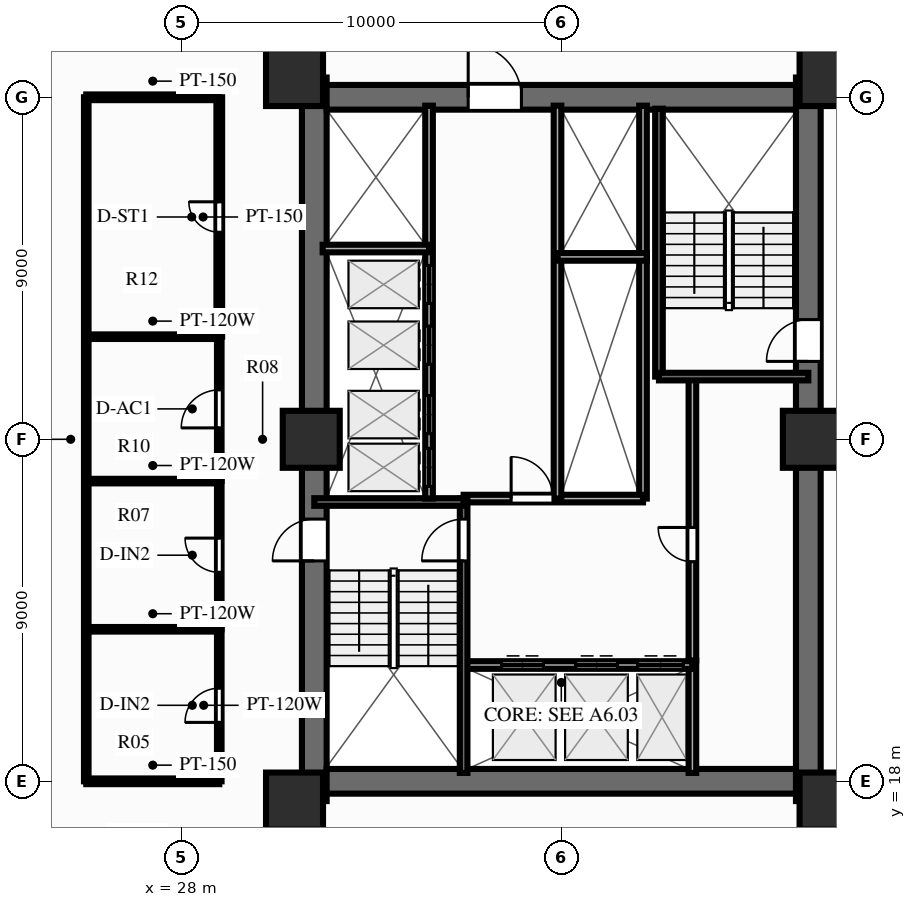
"""IFC4 building model, lengths in metres.
Left out: names, types, materials, properties, quantities, classifications, styles, units other than length and angle.
Written with IfcOpenShell. Run it as: python <this file> out.ifc"""

import sys

from ifc_helpers import new_model, si_unit, direction, frame, frame_2d, origin, origin_2d, place, context, subcontext, project, spatial, rectangle, extrude, source, transform, mapped, element, fill, save


model = new_model("IFC4")
c1 = context("Model", 3, precision=1e-05, world=origin(), true_north=direction((0.0, 1.0)))
c2 = subcontext(c1, "Body", "Model", "MODEL_VIEW")
j1 = project(units=[si_unit("LENGTHUNIT", "METRE"), si_unit("PLANEANGLEUNIT", "RADIAN")], contexts=[c1])
p1 = place(None, origin())
s1 = spatial("IfcSite", under=j1, at=p1, CompositionType="ELEMENT")
p2 = place(p1, origin())
s2 = spatial("IfcBuilding", under=s1, at=p2, CompositionType="ELEMENT")
p3 = place(p2, frame((0.0, 0.0, 7.8)))
s3 = spatial("IfcBuildingStorey", under=s2, at=p3, CompositionType="ELEMENT", Elevation=7.8)
p4 = place(p3, frame((31.5, 17.48, 0.0), z_axis=(0.0, 0.0, 1.0), x_axis=(0.0, 1.0, 0.0)))
e1 = element("IfcWall", 1, at=p4, inside=s3, PredefinedType="SHEAR", context=c2, shape_type="SweptSolid", body=[
    extrude(rectangle(XDim=19.04, YDim=0.65, at=frame_2d((9.52, 0.0))), origin(), (0.0, 0.0, 1.0), 3.6),
])
p5 = place(p4, frame((6.32, 0.0, 0.0)))
e2 = element("IfcOpeningElement", 2, at=p5, cuts=e1, PredefinedType="OPENING", context=c2, shape_type="SweptSolid", body=[
    extrude(rectangle(XDim=1.1, YDim=2.15, at=frame_2d((0.55, 1.075))), frame((0.0, 0.337, 0.0), z_axis=(0.0, -1.0, 0.0), x_axis=(1.0, 0.0, 0.0)), (0.0, 0.0, 1.0), 0.674),
])
p6 = place(p3, frame((44.5, 17.48, 0.0), z_axis=(0.0, 0.0, 1.0), x_axis=(0.0, 1.0, 0.0)))
e3 = element("IfcWall", 3, at=p6, inside=s3, PredefinedType="SHEAR", context=c2, shape_type="SweptSolid", body=[
    extrude(rectangle(XDim=19.04, YDim=0.65, at=frame_2d((9.52, 0.0))), origin(), (0.0, 0.0, 1.0), 3.6),
])
p7 = place(p6, frame((12.67, 0.0, 0.0), z_axis=(0.0, 0.0, 1.0), x_axis=(-1.0, 0.0, 0.0)))
e4 = element("IfcOpeningElement", 4, at=p7, cuts=e3, PredefinedType="OPENING", context=c2, shape_type="SweptSolid", body=[
    extrude(rectangle(XDim=1.1, YDim=2.15, at=frame_2d((0.55, 1.075))), frame((0.0, 0.337, 0.0), z_axis=(0.0, -1.0, 0.0), x_axis=(1.0, 0.0, 0.0)), (0.0, 0.0, 1.0), 0.674),
])
p8 = place(p3, frame((31.825, 18.0, 0.0), z_axis=(0.0, 0.0, 1.0), x_axis=(1.0, 0.0, 0.0)))
e5 = element("IfcWall", 5, at=p8, inside=s3, PredefinedType="SHEAR", context=c2, shape_type="SweptSolid", body=[
    extrude(rectangle(XDim=12.35, YDim=0.65, at=frame_2d((6.175, 0.0))), origin(), (0.0, 0.0, 1.0), 3.6),
])
p9 = place(p3, frame((31.825, 36.0, 0.0), z_axis=(0.0, 0.0, 1.0), x_axis=(1.0, 0.0, 0.0)))
e6 = element("IfcWall", 6, at=p9, inside=s3, PredefinedType="SHEAR", context=c2, shape_type="SweptSolid", body=[
    extrude(rectangle(XDim=12.35, YDim=0.65, at=frame_2d((6.175, 0.0))), origin(), (0.0, 0.0, 1.0), 3.6),
])
p10 = place(p9, frame((5.125, 0.0, 0.0), z_axis=(0.0, 0.0, 1.0), x_axis=(-1.0, 0.0, 0.0)))
e7 = element("IfcOpeningElement", 7, at=p10, cuts=e6, PredefinedType="OPENING", context=c2, shape_type="SweptSolid", body=[
    extrude(rectangle(XDim=1.4, YDim=2.15, at=frame_2d((0.7, 1.075))), frame((0.0, 0.337, 0.0), z_axis=(0.0, -1.0, 0.0), x_axis=(1.0, 0.0, 0.0)), (0.0, 0.0, 1.0), 0.674),
])
m1 = source(origin(), c2, "Body", "SweptSolid", [
    extrude(rectangle(XDim=1.5, YDim=1.5, at=origin_2d()), origin(), (0.0, 0.0, 1.0), 3.6),
])
for number, where, z_axis, x_axis in (
    (8, (30.98, 17.48, 0.0), (0.0, 0.0, 1.0), (1.0, 0.0, 0.0)),
    (9, (45.02, 17.48, 0.0), (0.0, 0.0, 1.0), (1.0, 0.0, 0.0)),
    (10, (30.98, 36.52, 0.0), (0.0, 0.0, 1.0), (1.0, 0.0, 0.0)),
    (11, (45.02, 36.52, 0.0), (0.0, 0.0, 1.0), (1.0, 0.0, 0.0)),
    (12, (31.42, 27.0, 0.0), (0.0, 0.0, 1.0), (1.0, 0.0, 0.0)),
    (13, (44.58, 27.0, 0.0), (0.0, 0.0, 1.0), (1.0, 0.0, 0.0)),
):
    element("IfcColumn", number, at=place(p3, frame(where, z_axis=z_axis, x_axis=x_axis)), inside=s3, PredefinedType="COLUMN", context=c2, shape_type="MappedRepresentation", body=[
        mapped(m1, transform((0.0, 0.0, 0.0), scale=1.0)),
    ])
p11 = place(p3, frame((41.45, 18.22, 0.0), z_axis=(0.0, 0.0, 1.0), x_axis=(0.0, 1.0, 0.0)))
e14 = element("IfcWall", 14, at=p11, inside=s3, PredefinedType="PARTITIONING", context=c2, shape_type="SweptSolid", body=[
    extrude(rectangle(XDim=2.96, YDim=0.2, at=frame_2d((1.48, 0.0))), origin(), (0.0, 0.0, 1.0), 3.32),
])
p12 = place(p3, frame((41.45, 21.18, 0.0), z_axis=(0.0, 0.0, 1.0), x_axis=(0.0, 1.0, 0.0)))
e15 = element("IfcWall", 15, at=p12, inside=s3, PredefinedType="PARTITIONING", context=c2, shape_type="SweptSolid", body=[
    extrude(rectangle(XDim=7.42, YDim=0.2, at=frame_2d((3.71, 0.0))), origin(), (0.0, 0.0, 1.0), 3.32),
])
p13 = place(p12, frame((2.6, 0.0, 0.0)))
e16 = element("IfcOpeningElement", 16, at=p13, cuts=e15, PredefinedType="OPENING", context=c2, shape_type="SweptSolid", body=[
    extrude(rectangle(XDim=0.9, YDim=2.1, at=frame_2d((0.45, 1.05))), frame((0.0, 0.112, 0.0), z_axis=(0.0, -1.0, 0.0), x_axis=(1.0, 0.0, 0.0)), (0.0, 0.0, 1.0), 0.224),
])
p14 = place(p3, frame((40.15, 25.44, 0.0), z_axis=(0.0, 0.0, 1.0), x_axis=(0.0, 1.0, 0.0)))
e17 = element("IfcWall", 17, at=p14, inside=s3, PredefinedType="PARTITIONING", context=c2, shape_type="SweptSolid", body=[
    extrude(rectangle(XDim=6.36, YDim=0.2, at=frame_2d((3.18, 0.0))), origin(), (0.0, 0.0, 1.0), 3.32),
])
p15 = place(p3, frame((40.15, 31.8, 0.0), z_axis=(0.0, 0.0, 1.0), x_axis=(0.0, 1.0, 0.0)))
e18 = element("IfcWall", 18, at=p15, inside=s3, PredefinedType="PARTITIONING", context=c2, shape_type="SweptSolid", body=[
    extrude(rectangle(XDim=3.98, YDim=0.2, at=frame_2d((1.99, 0.0))), origin(), (0.0, 0.0, 1.0), 3.32),
])
p16 = place(p3, frame((35.43, 21.06, 0.0), z_axis=(0.0, 0.0, 1.0), x_axis=(1.0, 0.0, 0.0)))
e19 = element("IfcWall", 19, at=p16, inside=s3, PredefinedType="PARTITIONING", context=c2, shape_type="SweptSolid", body=[
    extrude(rectangle(XDim=6.02, YDim=0.2, at=frame_2d((3.01, 0.0))), origin(), (0.0, 0.0, 1.0), 3.32),
])
p17 = place(p16, frame((1.0, 0.0, 0.0)))
e20 = element("IfcOpeningElement", 20, at=p17, cuts=e19, PredefinedType="OPENING", context=c2, shape_type="SweptSolid", body=[
    extrude(rectangle(XDim=1.1, YDim=2.15, at=frame_2d((0.55, 1.075))), frame((0.0, 0.112, 0.0), z_axis=(0.0, -1.0, 0.0), x_axis=(1.0, 0.0, 0.0)), (0.0, 0.0, 1.0), 0.224),
])
p18 = place(p16, frame((2.95, 0.0, 0.0)))
e21 = element("IfcOpeningElement", 21, at=p18, cuts=e19, PredefinedType="OPENING", context=c2, shape_type="SweptSolid", body=[
    extrude(rectangle(XDim=1.1, YDim=2.15, at=frame_2d((0.55, 1.075))), frame((0.0, 0.112, 0.0), z_axis=(0.0, -1.0, 0.0), x_axis=(1.0, 0.0, 0.0)), (0.0, 0.0, 1.0), 0.224),
])
p19 = place(p16, frame((4.58, 0.0, 0.0)))
e22 = element("IfcOpeningElement", 22, at=p19, cuts=e19, PredefinedType="OPENING", context=c2, shape_type="SweptSolid", body=[
    extrude(rectangle(XDim=1.2, YDim=2.15, at=frame_2d((0.6, 1.075))), frame((0.0, 0.112, 0.0), z_axis=(0.0, -1.0, 0.0), x_axis=(1.0, 0.0, 0.0)), (0.0, 0.0, 1.0), 0.224),
])
p20 = place(p3, frame((35.43, 25.44, 0.0), z_axis=(0.0, 0.0, 1.0), x_axis=(1.0, 0.0, 0.0)))
e23 = element("IfcWall", 23, at=p20, inside=s3, PredefinedType="PARTITIONING", context=c2, shape_type="SweptSolid", body=[
    extrude(rectangle(XDim=4.72, YDim=0.2, at=frame_2d((2.36, 0.0))), origin(), (0.0, 0.0, 1.0), 3.32),
])
p21 = place(p20, frame((1.25, 0.0, 0.0)))
e24 = element("IfcOpeningElement", 24, at=p21, cuts=e23, PredefinedType="OPENING", context=c2, shape_type="SweptSolid", body=[
    extrude(rectangle(XDim=1.1, YDim=2.15, at=frame_2d((0.55, 1.075))), frame((0.0, 0.112, 0.0), z_axis=(0.0, -1.0, 0.0), x_axis=(1.0, 0.0, 0.0)), (0.0, 0.0, 1.0), 0.224),
])
p22 = place(p3, frame((35.43, 18.22, 0.0), z_axis=(0.0, 0.0, 1.0), x_axis=(0.0, 1.0, 0.0)))
e25 = element("IfcWall", 25, at=p22, inside=s3, PredefinedType="SOLIDWALL", context=c2, shape_type="SweptSolid", body=[
    extrude(rectangle(XDim=7.22, YDim=0.2, at=frame_2d((3.61, 0.0))), origin(), (0.0, 0.0, 1.0), 3.32),
])
p23 = place(p22, frame((6.68, 0.0, 0.0), z_axis=(0.0, 0.0, 1.0), x_axis=(-1.0, 0.0, 0.0)))
e26 = element("IfcOpeningElement", 26, at=p23, cuts=e25, PredefinedType="OPENING", context=c2, shape_type="SweptSolid", body=[
    extrude(rectangle(XDim=1.1, YDim=2.15, at=frame_2d((0.55, 1.075))), frame((0.0, 0.112, 0.0), z_axis=(0.0, -1.0, 0.0), x_axis=(1.0, 0.0, 0.0)), (0.0, 0.0, 1.0), 0.224),
])
p24 = place(p3, frame((31.5, 25.35, 0.0), z_axis=(0.0, 0.0, 1.0), x_axis=(1.0, 0.0, 0.0)))
e27 = element("IfcWall", 27, at=p24, inside=s3, PredefinedType="SOLIDWALL", context=c2, shape_type="SweptSolid", body=[
    extrude(rectangle(XDim=3.93, YDim=0.2, at=frame_2d((1.965, 0.0))), origin(), (0.0, 0.0, 1.0), 3.32),
])
p25 = place(p3, frame((40.57, 28.65, 0.0), z_axis=(0.0, 0.0, 1.0), x_axis=(0.0, 1.0, 0.0)))
e28 = element("IfcWall", 28, at=p25, inside=s3, PredefinedType="SOLIDWALL", context=c2, shape_type="SweptSolid", body=[
    extrude(rectangle(XDim=7.05, YDim=0.2, at=frame_2d((3.525, 0.0))), origin(), (0.0, 0.0, 1.0), 3.32),
])
p26 = place(p3, frame((40.57, 28.65, 0.0), z_axis=(0.0, 0.0, 1.0), x_axis=(1.0, 0.0, 0.0)))
e29 = element("IfcWall", 29, at=p26, inside=s3, PredefinedType="SOLIDWALL", context=c2, shape_type="SweptSolid", body=[
    extrude(rectangle(XDim=3.93, YDim=0.2, at=frame_2d((1.965, 0.0))), origin(), (0.0, 0.0, 1.0), 3.32),
])
p27 = place(p3, frame((34.52, 25.44, 0.0), z_axis=(0.0, 0.0, 1.0), x_axis=(0.0, 1.0, 0.0)))
e30 = element("IfcWall", 30, at=p27, inside=s3, PredefinedType="PARTITIONING", context=c2, shape_type="SweptSolid", body=[
    extrude(rectangle(XDim=10.34, YDim=0.2, at=frame_2d((5.17, 0.0))), origin(), (0.0, 0.0, 1.0), 3.32),
])
p28 = place(p27, frame((0.32, 0.0, 0.0)))
e31 = element("IfcOpeningElement", 31, at=p28, cuts=e30, PredefinedType="OPENING", context=c2, shape_type="SweptSolid", body=[
    extrude(rectangle(XDim=1.0, YDim=2.15, at=frame_2d((0.5, 1.075))), frame((0.0, 0.112, 0.0), z_axis=(0.0, -1.0, 0.0), x_axis=(1.0, 0.0, 0.0)), (0.0, 0.0, 1.0), 0.224),
])
p29 = place(p27, frame((1.71, 0.0, 0.0)))
e32 = element("IfcOpeningElement", 32, at=p29, cuts=e30, PredefinedType="OPENING", context=c2, shape_type="SweptSolid", body=[
    extrude(rectangle(XDim=1.0, YDim=2.15, at=frame_2d((0.5, 1.075))), frame((0.0, 0.112, 0.0), z_axis=(0.0, -1.0, 0.0), x_axis=(1.0, 0.0, 0.0)), (0.0, 0.0, 1.0), 0.224),
])
p30 = place(p27, frame((3.535, 0.0, 0.0)))
e33 = element("IfcOpeningElement", 33, at=p30, cuts=e30, PredefinedType="OPENING", context=c2, shape_type="SweptSolid", body=[
    extrude(rectangle(XDim=1.0, YDim=2.15, at=frame_2d((0.5, 1.075))), frame((0.0, 0.112, 0.0), z_axis=(0.0, -1.0, 0.0), x_axis=(1.0, 0.0, 0.0)), (0.0, 0.0, 1.0), 0.224),
])
p31 = place(p27, frame((5.135, 0.0, 0.0)))
e34 = element("IfcOpeningElement", 34, at=p31, cuts=e30, PredefinedType="OPENING", context=c2, shape_type="SweptSolid", body=[
    extrude(rectangle(XDim=1.0, YDim=2.15, at=frame_2d((0.5, 1.075))), frame((0.0, 0.112, 0.0), z_axis=(0.0, -1.0, 0.0), x_axis=(1.0, 0.0, 0.0)), (0.0, 0.0, 1.0), 0.224),
])
p32 = place(p3, frame((31.72, 32.02, 0.0), z_axis=(0.0, 0.0, 1.0), x_axis=(1.0, 0.0, 0.0)))
e35 = element("IfcWall", 35, at=p32, inside=s3, PredefinedType="PARTITIONING", context=c2, shape_type="SweptSolid", body=[
    extrude(rectangle(XDim=2.8, YDim=0.2, at=frame_2d((1.4, 0.0))), origin(), (0.0, 0.0, 1.0), 3.32),
])
p33 = place(p3, frame((37.9, 25.44, 0.0), z_axis=(0.0, 0.0, 1.0), x_axis=(0.0, 1.0, 0.0)))
e36 = element("IfcWall", 36, at=p33, inside=s3, PredefinedType="PARTITIONING", context=c2, shape_type="SweptSolid", body=[
    extrude(rectangle(XDim=10.34, YDim=0.2, at=frame_2d((5.17, 0.0))), origin(), (0.0, 0.0, 1.0), 3.32),
])
p34 = place(p3, frame((37.9, 31.8, 0.0), z_axis=(0.0, 0.0, 1.0), x_axis=(1.0, 0.0, 0.0)))
e37 = element("IfcWall", 37, at=p34, inside=s3, PredefinedType="PARTITIONING", context=c2, shape_type="SweptSolid", body=[
    extrude(rectangle(XDim=2.35, YDim=0.2, at=frame_2d((1.175, 0.0))), origin(), (0.0, 0.0, 1.0), 3.32),
])
p35 = place(p3, frame((25.5, 18.0, 0.0), z_axis=(0.0, 0.0, 1.0), x_axis=(0.0, 1.0, 0.0)))
e38 = element("IfcWall", 38, at=p35, inside=s3, PredefinedType="PARTITIONING", context=c2, shape_type="SweptSolid", body=[
    extrude(rectangle(XDim=18.0, YDim=0.12, at=frame_2d((9.0, 0.0))), origin(), (0.0, 0.0, 1.0), 3.32),
])
p36 = place(p3, frame((29.0, 18.0, 0.0), z_axis=(0.0, 0.0, 1.0), x_axis=(0.0, 1.0, 0.0)))
e39 = element("IfcWall", 39, at=p36, inside=s3, PredefinedType="PARTITIONING", context=c2, shape_type="SweptSolid", body=[
    extrude(rectangle(XDim=4.0, YDim=0.12, at=frame_2d((2.0, 0.0))), origin(), (0.0, 0.0, 1.0), 3.32),
])
p37 = place(p36, frame((1.55, 0.0, 0.0)))
e40 = element("IfcOpeningElement", 40, at=p37, cuts=e39, PredefinedType="OPENING", context=c2, shape_type="SweptSolid", body=[
    extrude(rectangle(XDim=0.9, YDim=2.1, at=frame_2d((0.45, 1.05))), frame((0.0, 0.072, 0.0), z_axis=(0.0, -1.0, 0.0), x_axis=(1.0, 0.0, 0.0)), (0.0, 0.0, 1.0), 0.144),
])
p38 = place(p3, frame((29.0, 22.0, 0.0), z_axis=(0.0, 0.0, 1.0), x_axis=(0.0, 1.0, 0.0)))
e41 = element("IfcWall", 41, at=p38, inside=s3, PredefinedType="PARTITIONING", context=c2, shape_type="SweptSolid", body=[
    extrude(rectangle(XDim=3.9, YDim=0.12, at=frame_2d((1.95, 0.0))), origin(), (0.0, 0.0, 1.0), 3.32),
])
p39 = place(p38, frame((1.5, 0.0, 0.0)))
e42 = element("IfcOpeningElement", 42, at=p39, cuts=e41, PredefinedType="OPENING", context=c2, shape_type="SweptSolid", body=[
    extrude(rectangle(XDim=0.9, YDim=2.1, at=frame_2d((0.45, 1.05))), frame((0.0, 0.072, 0.0), z_axis=(0.0, -1.0, 0.0), x_axis=(1.0, 0.0, 0.0)), (0.0, 0.0, 1.0), 0.144),
])
p40 = place(p3, frame((29.0, 25.9, 0.0), z_axis=(0.0, 0.0, 1.0), x_axis=(0.0, 1.0, 0.0)))
e43 = element("IfcWall", 43, at=p40, inside=s3, PredefinedType="PARTITIONING", context=c2, shape_type="SweptSolid", body=[
    extrude(rectangle(XDim=3.8, YDim=0.12, at=frame_2d((1.9, 0.0))), origin(), (0.0, 0.0, 1.0), 3.32),
])
p41 = place(p40, frame((1.4, 0.0, 0.0)))
e44 = element("IfcOpeningElement", 44, at=p41, cuts=e43, PredefinedType="OPENING", context=c2, shape_type="SweptSolid", body=[
    extrude(rectangle(XDim=1.0, YDim=2.1, at=frame_2d((0.5, 1.05))), frame((0.0, 0.072, 0.0), z_axis=(0.0, -1.0, 0.0), x_axis=(1.0, 0.0, 0.0)), (0.0, 0.0, 1.0), 0.144),
])
p42 = place(p3, frame((29.0, 29.7, 0.0), z_axis=(0.0, 0.0, 1.0), x_axis=(0.0, 1.0, 0.0)))
e45 = element("IfcWall", 45, at=p42, inside=s3, PredefinedType="PARTITIONING", context=c2, shape_type="SweptSolid", body=[
    extrude(rectangle(XDim=6.3, YDim=0.15, at=frame_2d((3.15, 0.0))), origin(), (0.0, 0.0, 1.0), 3.32),
])
p43 = place(p42, frame((2.75, 0.0, 0.0)))
e46 = element("IfcOpeningElement", 46, at=p43, cuts=e45, PredefinedType="OPENING", context=c2, shape_type="SweptSolid", body=[
    extrude(rectangle(XDim=0.8, YDim=2.05, at=frame_2d((0.4, 1.025))), frame((0.0, 0.087, 0.0), z_axis=(0.0, -1.0, 0.0), x_axis=(1.0, 0.0, 0.0)), (0.0, 0.0, 1.0), 0.174),
])
for number, where, z_axis, x_axis in (
    (47, (25.5, 22.0, 0.0), (0.0, 0.0, 1.0), (1.0, 0.0, 0.0)),
    (48, (25.5, 25.9, 0.0), (0.0, 0.0, 1.0), (1.0, 0.0, 0.0)),
    (49, (25.5, 29.7, 0.0), (0.0, 0.0, 1.0), (1.0, 0.0, 0.0)),
):
    element("IfcWall", number, at=place(p3, frame(where, z_axis=z_axis, x_axis=x_axis)), inside=s3, PredefinedType="PARTITIONING", context=c2, shape_type="SweptSolid", body=[
        extrude(rectangle(XDim=3.5, YDim=0.12, at=frame_2d((1.75, 0.0))), origin(), (0.0, 0.0, 1.0), 3.32),
    ])
for number, where, z_axis, x_axis in (
    (50, (25.5, 36.0, 0.0), (0.0, 0.0, 1.0), (1.0, 0.0, 0.0)),
    (51, (25.5, 18.0, 0.0), (0.0, 0.0, 1.0), (1.0, 0.0, 0.0)),
):
    element("IfcWall", number, at=place(p3, frame(where, z_axis=z_axis, x_axis=x_axis)), inside=s3, PredefinedType="PARTITIONING", context=c2, shape_type="SweptSolid", body=[
        extrude(rectangle(XDim=3.5, YDim=0.15, at=frame_2d((1.75, 0.0))), origin(), (0.0, 0.0, 1.0), 2.69),
    ])
m2 = source(origin(), c2, "Body", "SweptSolid", [
    extrude(rectangle(XDim=1.1, YDim=2.15, at=frame_2d((0.55, 1.075))), frame((0.0, 0.025, 0.0), z_axis=(0.0, -1.0, 0.0), x_axis=(1.0, 0.0, 0.0)), (0.0, 0.0, 1.0), 0.05),
])
p44 = place(p5, origin())
e52 = element("IfcDoor", 52, at=p44, inside=s3, OperationType="SINGLE_SWING_LEFT", PredefinedType="DOOR", context=c2, shape_type="MappedRepresentation", body=[
    mapped(m2, transform((0.0, 0.0, 0.0), scale=1.0)),
])
fill(e2, e52)
p45 = place(p7, origin())
e53 = element("IfcDoor", 53, at=p45, inside=s3, OperationType="SINGLE_SWING_RIGHT", PredefinedType="DOOR", context=c2, shape_type="MappedRepresentation", body=[
    mapped(m2, transform((0.0, 0.0, 0.0), scale=1.0)),
])
fill(e4, e53)
m3 = source(origin(), c2, "Body", "SweptSolid", [
    extrude(rectangle(XDim=1.4, YDim=2.15, at=frame_2d((0.7, 1.075))), frame((0.0, 0.025, 0.0), z_axis=(0.0, -1.0, 0.0), x_axis=(1.0, 0.0, 0.0)), (0.0, 0.0, 1.0), 0.05),
])
p46 = place(p10, origin())
e54 = element("IfcDoor", 54, at=p46, inside=s3, OperationType="SINGLE_SWING_RIGHT", PredefinedType="DOOR", context=c2, shape_type="MappedRepresentation", body=[
    mapped(m3, transform((0.0, 0.0, 0.0), scale=1.0)),
])
fill(e7, e54)
m4 = source(origin(), c2, "Body", "SweptSolid", [
    extrude(rectangle(XDim=0.9, YDim=2.1, at=frame_2d((0.45, 1.05))), frame((0.0, 0.025, 0.0), z_axis=(0.0, -1.0, 0.0), x_axis=(1.0, 0.0, 0.0)), (0.0, 0.0, 1.0), 0.05),
])
p47 = place(p13, origin())
e55 = element("IfcDoor", 55, at=p47, inside=s3, OperationType="SINGLE_SWING_RIGHT", PredefinedType="DOOR", context=c2, shape_type="MappedRepresentation", body=[
    mapped(m4, transform((0.0, 0.0, 0.0), scale=1.0)),
])
fill(e16, e55)
p48 = place(p17, origin())
e56 = element("IfcDoor", 56, at=p48, inside=s3, OperationType="DOUBLE_DOOR_SLIDING", PredefinedType="DOOR", context=c2, shape_type="MappedRepresentation", body=[
    mapped(m2, transform((0.0, 0.0, 0.0), scale=1.0)),
])
fill(e20, e56)
p49 = place(p18, origin())
e57 = element("IfcDoor", 57, at=p49, inside=s3, OperationType="DOUBLE_DOOR_SLIDING", PredefinedType="DOOR", context=c2, shape_type="MappedRepresentation", body=[
    mapped(m2, transform((0.0, 0.0, 0.0), scale=1.0)),
])
fill(e21, e57)
m5 = source(origin(), c2, "Body", "SweptSolid", [
    extrude(rectangle(XDim=1.2, YDim=2.15, at=frame_2d((0.6, 1.075))), frame((0.0, 0.025, 0.0), z_axis=(0.0, -1.0, 0.0), x_axis=(1.0, 0.0, 0.0)), (0.0, 0.0, 1.0), 0.05),
])
p50 = place(p19, origin())
e58 = element("IfcDoor", 58, at=p50, inside=s3, OperationType="DOUBLE_DOOR_SLIDING", PredefinedType="DOOR", context=c2, shape_type="MappedRepresentation", body=[
    mapped(m5, transform((0.0, 0.0, 0.0), scale=1.0)),
])
fill(e22, e58)
p51 = place(p21, origin())
e59 = element("IfcDoor", 59, at=p51, inside=s3, OperationType="SINGLE_SWING_LEFT", PredefinedType="DOOR", context=c2, shape_type="MappedRepresentation", body=[
    mapped(m2, transform((0.0, 0.0, 0.0), scale=1.0)),
])
fill(e24, e59)
p52 = place(p23, origin())
e60 = element("IfcDoor", 60, at=p52, inside=s3, OperationType="SINGLE_SWING_RIGHT", PredefinedType="DOOR", context=c2, shape_type="MappedRepresentation", body=[
    mapped(m2, transform((0.0, 0.0, 0.0), scale=1.0)),
])
fill(e26, e60)
m6 = source(origin(), c2, "Body", "SweptSolid", [
    extrude(rectangle(XDim=1.0, YDim=2.15, at=frame_2d((0.5, 1.075))), frame((0.0, 0.025, 0.0), z_axis=(0.0, -1.0, 0.0), x_axis=(1.0, 0.0, 0.0)), (0.0, 0.0, 1.0), 0.05),
])
p53 = place(p28, origin())
e61 = element("IfcDoor", 61, at=p53, inside=s3, OperationType="DOUBLE_DOOR_SLIDING", PredefinedType="DOOR", context=c2, shape_type="MappedRepresentation", body=[
    mapped(m6, transform((0.0, 0.0, 0.0), scale=1.0)),
])
fill(e31, e61)
p54 = place(p29, origin())
e62 = element("IfcDoor", 62, at=p54, inside=s3, OperationType="DOUBLE_DOOR_SLIDING", PredefinedType="DOOR", context=c2, shape_type="MappedRepresentation", body=[
    mapped(m6, transform((0.0, 0.0, 0.0), scale=1.0)),
])
fill(e32, e62)
p55 = place(p30, origin())
e63 = element("IfcDoor", 63, at=p55, inside=s3, OperationType="DOUBLE_DOOR_SLIDING", PredefinedType="DOOR", context=c2, shape_type="MappedRepresentation", body=[
    mapped(m6, transform((0.0, 0.0, 0.0), scale=1.0)),
])
fill(e33, e63)
p56 = place(p31, origin())
e64 = element("IfcDoor", 64, at=p56, inside=s3, OperationType="DOUBLE_DOOR_SLIDING", PredefinedType="DOOR", context=c2, shape_type="MappedRepresentation", body=[
    mapped(m6, transform((0.0, 0.0, 0.0), scale=1.0)),
])
fill(e34, e64)
p57 = place(p37, origin())
e65 = element("IfcDoor", 65, at=p57, inside=s3, OperationType="SINGLE_SWING_LEFT", PredefinedType="DOOR", context=c2, shape_type="MappedRepresentation", body=[
    mapped(m4, transform((0.0, 0.0, 0.0), scale=1.0)),
])
fill(e40, e65)
p58 = place(p39, origin())
e66 = element("IfcDoor", 66, at=p58, inside=s3, OperationType="SINGLE_SWING_RIGHT", PredefinedType="DOOR", context=c2, shape_type="MappedRepresentation", body=[
    mapped(m4, transform((0.0, 0.0, 0.0), scale=1.0)),
])
fill(e42, e66)
m7 = source(origin(), c2, "Body", "SweptSolid", [
    extrude(rectangle(XDim=1.0, YDim=2.1, at=frame_2d((0.5, 1.05))), frame((0.0, 0.025, 0.0), z_axis=(0.0, -1.0, 0.0), x_axis=(1.0, 0.0, 0.0)), (0.0, 0.0, 1.0), 0.05),
])
p59 = place(p41, origin())
e67 = element("IfcDoor", 67, at=p59, inside=s3, OperationType="SINGLE_SWING_LEFT", PredefinedType="DOOR", context=c2, shape_type="MappedRepresentation", body=[
    mapped(m7, transform((0.0, 0.0, 0.0), scale=1.0)),
])
fill(e44, e67)
m8 = source(origin(), c2, "Body", "SweptSolid", [
    extrude(rectangle(XDim=0.8, YDim=2.05, at=frame_2d((0.4, 1.025))), frame((0.0, 0.025, 0.0), z_axis=(0.0, -1.0, 0.0), x_axis=(1.0, 0.0, 0.0)), (0.0, 0.0, 1.0), 0.05),
])
p60 = place(p43, origin())
e68 = element("IfcDoor", 68, at=p60, inside=s3, OperationType="SINGLE_SWING_RIGHT", PredefinedType="DOOR", context=c2, shape_type="MappedRepresentation", body=[
    mapped(m8, transform((0.0, 0.0, 0.0), scale=1.0)),
])
fill(e46, e68)
save(model, sys.argv[1])
